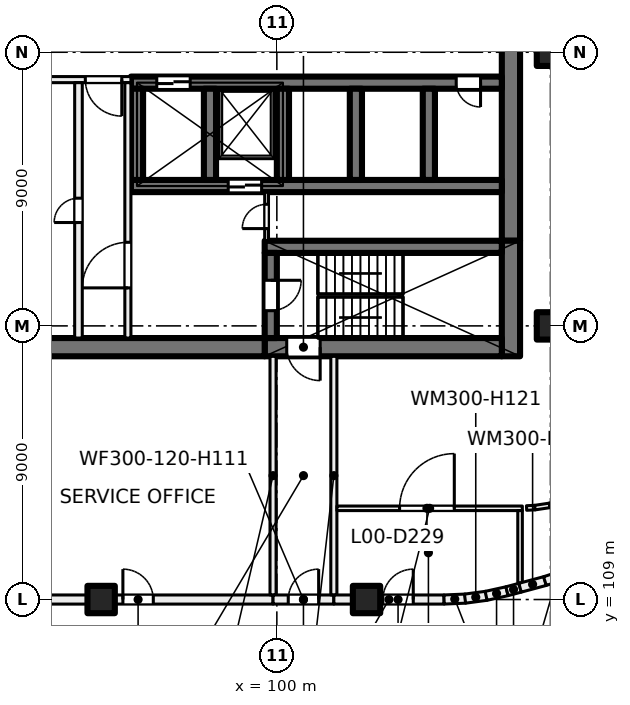
"""IFC4 building model, lengths in metres.
Left out: names, types, materials, properties, quantities, classifications, styles, units other than length and angle.
Written with IfcOpenShell. Run it as: python <this file> out.ifc"""

import sys

from ifc_helpers import new_model, si_unit, direction, frame, frame_2d, origin, origin_2d, place, context, subcontext, project, spatial, rectangle, extrude, element, fill, save


model = new_model("IFC4")
c1 = context("Model", 3, precision=1e-05, world=origin(), true_north=direction((0.0, 1.0)))
c2 = subcontext(c1, "Body", "Model", "MODEL_VIEW")
j1 = project(units=[si_unit("LENGTHUNIT", "METRE"), si_unit("PLANEANGLEUNIT", "RADIAN")], contexts=[c1])
p1 = place(None, origin())
s1 = spatial("IfcSite", under=j1, at=p1, CompositionType="ELEMENT")
p2 = place(p1, origin())
s2 = spatial("IfcBuilding", under=s1, at=p2, CompositionType="ELEMENT")
p3 = place(p2, origin())
s3 = spatial("IfcBuildingStorey", under=s2, at=p3, CompositionType="ELEMENT", Elevation=0.0)
for number, where, z_axis, x_axis in (
    (1, (109.0, 118.0, 0.0), (0.0, 0.0, 1.0), (1.0, 0.0, 0.0)),
    (2, (109.0, 127.0, 0.0), (0.0, 0.0, 1.0), (1.0, 0.0, 0.0)),
    (3, (94.221, 109.0, 0.0), (0.0, 0.0, 1.0), (1.0, 0.0, 0.0)),
    (4, (102.95, 109.0, 0.0), (0.0, 0.0, 1.0), (1.0, 0.0, 0.0)),
):
    element("IfcColumn", number, at=place(p3, frame(where, z_axis=z_axis, x_axis=x_axis)), inside=s3, PredefinedType="COLUMN", context=c2, shape_type="SweptSolid", body=[
        extrude(rectangle(XDim=0.9, YDim=0.9, at=origin_2d()), origin(), (0.0, 0.0, 1.0), 7.5),
    ])
p4 = place(p3, frame((107.7, 135.2, 0.0), z_axis=(0.0, 0.0, 1.0), x_axis=(0.0, -1.0, 0.0)))
e5 = element("IfcWall", 5, at=p4, inside=s3, PredefinedType="SHEAR", context=c2, shape_type="SweptSolid", body=[
    extrude(rectangle(XDim=14.4, YDim=0.6, at=frame_2d((7.2, 0.0))), origin(), (0.0, 0.0, 1.0), 7.5),
])
p5 = place(p3, frame((107.7, 120.8, 0.0), z_axis=(0.0, 0.0, 1.0), x_axis=(0.0, -1.0, 0.0)))
e6 = element("IfcWall", 6, at=p5, inside=s3, PredefinedType="SHEAR", context=c2, shape_type="SweptSolid", body=[
    extrude(rectangle(XDim=3.8, YDim=0.6, at=frame_2d((1.9, 0.0))), origin(), (0.0, 0.0, 1.0), 7.5),
])
p6 = place(p3, frame((107.4, 117.3, 0.0), z_axis=(0.0, 0.0, 1.0), x_axis=(-1.0, 0.0, 0.0)))
e7 = element("IfcWall", 7, at=p6, inside=s3, PredefinedType="SHEAR", context=c2, shape_type="SweptSolid", body=[
    extrude(rectangle(XDim=7.8, YDim=0.6, at=frame_2d((3.9, 0.0))), origin(), (0.0, 0.0, 1.0), 7.5),
])
p7 = place(p6, frame((5.975, 0.0, 0.0)))
e8 = element("IfcOpeningElement", 8, at=p7, cuts=e7, PredefinedType="OPENING", context=c2, shape_type="SweptSolid", body=[
    extrude(rectangle(XDim=1.1, YDim=2.1, at=frame_2d((0.55, 1.05))), frame((0.0, 0.31, 0.0), z_axis=(0.0, -1.0, 0.0), x_axis=(1.0, 0.0, 0.0)), (0.0, 0.0, 1.0), 0.62),
])
p8 = place(p3, frame((99.6, 117.3, 0.0), z_axis=(0.0, 0.0, 1.0), x_axis=(-1.0, 0.0, 0.0)))
e9 = element("IfcWall", 9, at=p8, inside=s3, PredefinedType="SHEAR", context=c2, shape_type="SweptSolid", body=[
    extrude(rectangle(XDim=8.9, YDim=0.6, at=frame_2d((4.45, 0.0))), origin(), (0.0, 0.0, 1.0), 7.5),
])
p9 = place(p3, frame((107.4, 120.6, 0.0), z_axis=(0.0, 0.0, 1.0), x_axis=(-1.0, 0.0, 0.0)))
e10 = element("IfcWall", 10, at=p9, inside=s3, PredefinedType="SHEAR", context=c2, shape_type="SweptSolid", body=[
    extrude(rectangle(XDim=7.8, YDim=0.4, at=frame_2d((3.9, 0.0))), origin(), (0.0, 0.0, 1.0), 7.5),
])
p10 = place(p3, frame((99.8, 120.4, 0.0), z_axis=(0.0, 0.0, 1.0), x_axis=(0.0, -1.0, 0.0)))
e11 = element("IfcWall", 11, at=p10, inside=s3, PredefinedType="SHEAR", context=c2, shape_type="SweptSolid", body=[
    extrude(rectangle(XDim=2.8, YDim=0.4, at=frame_2d((1.4, 0.0))), origin(), (0.0, 0.0, 1.0), 7.5),
])
p11 = place(p10, frame((0.9, 0.0, 0.0)))
e12 = element("IfcOpeningElement", 12, at=p11, cuts=e11, PredefinedType="OPENING", context=c2, shape_type="SweptSolid", body=[
    extrude(rectangle(XDim=1.0, YDim=2.1, at=frame_2d((0.5, 1.05))), frame((0.0, 0.21, 0.0), z_axis=(0.0, -1.0, 0.0), x_axis=(1.0, 0.0, 0.0)), (0.0, 0.0, 1.0), 0.42),
])
p12 = place(p3, frame((107.4, 126.0, 0.0), z_axis=(0.0, 0.0, 1.0), x_axis=(-1.0, 0.0, 0.0)))
e13 = element("IfcWall", 13, at=p12, inside=s3, PredefinedType="SHEAR", context=c2, shape_type="SweptSolid", body=[
    extrude(rectangle(XDim=12.2, YDim=0.4, at=frame_2d((6.1, 0.0))), origin(), (0.0, 0.0, 1.0), 7.5),
])
p13 = place(p12, frame((10.25, 0.0, 0.0)))
e14 = element("IfcOpeningElement", 14, at=p13, cuts=e13, PredefinedType="OPENING", context=c2, shape_type="SweptSolid", body=[
    extrude(rectangle(XDim=1.1, YDim=2.1, at=frame_2d((0.55, 1.05))), frame((0.0, 0.21, 0.0), z_axis=(0.0, -1.0, 0.0), x_axis=(1.0, 0.0, 0.0)), (0.0, 0.0, 1.0), 0.42),
])
p14 = place(p12, frame((0.7, 0.0, 0.0)))
e15 = element("IfcOpeningElement", 15, at=p14, cuts=e13, PredefinedType="OPENING", context=c2, shape_type="SweptSolid", body=[
    extrude(rectangle(XDim=0.8, YDim=2.1, at=frame_2d((0.4, 1.05))), frame((0.0, 0.21, 0.0), z_axis=(0.0, -1.0, 0.0), x_axis=(1.0, 0.0, 0.0)), (0.0, 0.0, 1.0), 0.42),
])
p15 = place(p3, frame((107.4, 122.6, 0.0), z_axis=(0.0, 0.0, 1.0), x_axis=(-1.0, 0.0, 0.0)))
e16 = element("IfcWall", 16, at=p15, inside=s3, PredefinedType="SHEAR", context=c2, shape_type="SweptSolid", body=[
    extrude(rectangle(XDim=12.2, YDim=0.4, at=frame_2d((6.1, 0.0))), origin(), (0.0, 0.0, 1.0), 7.5),
])
p16 = place(p15, frame((7.9, 0.0, 0.0)))
e17 = element("IfcOpeningElement", 17, at=p16, cuts=e16, PredefinedType="OPENING", context=c2, shape_type="SweptSolid", body=[
    extrude(rectangle(XDim=1.1, YDim=2.1, at=frame_2d((0.55, 1.05))), frame((0.0, 0.21, 0.0), z_axis=(0.0, -1.0, 0.0), x_axis=(1.0, 0.0, 0.0)), (0.0, 0.0, 1.0), 0.42),
])
for number, where, z_axis, x_axis in (
    (18, (105.0, 125.8, 0.0), (0.0, 0.0, 1.0), (0.0, -1.0, 0.0)),
    (19, (102.6, 125.8, 0.0), (0.0, 0.0, 1.0), (0.0, -1.0, 0.0)),
    (20, (100.2, 125.8, 0.0), (0.0, 0.0, 1.0), (0.0, -1.0, 0.0)),
    (21, (97.8, 125.8, 0.0), (0.0, 0.0, 1.0), (0.0, -1.0, 0.0)),
    (22, (95.4, 125.8, 0.0), (0.0, 0.0, 1.0), (0.0, -1.0, 0.0)),
):
    element("IfcWall", number, at=place(p3, frame(where, z_axis=z_axis, x_axis=x_axis)), inside=s3, PredefinedType="SHEAR", context=c2, shape_type="SweptSolid", body=[
        extrude(rectangle(XDim=3.0, YDim=0.4, at=frame_2d((1.5, 0.0))), origin(), (0.0, 0.0, 1.0), 7.5),
    ])
p17 = place(p3, frame((95.2, 126.1, 0.0), z_axis=(0.0, 0.0, 1.0), x_axis=(-1.0, 0.0, 0.0)))
e23 = element("IfcWall", 23, at=p17, inside=s3, PredefinedType="PARTITIONING", context=c2, shape_type="SweptSolid", body=[
    extrude(rectangle(XDim=3.8, YDim=0.2, at=frame_2d((1.9, 0.0))), origin(), (0.0, 0.0, 1.0), 7.1),
])
p18 = place(p17, frame((0.3, 0.0, 0.0)))
e24 = element("IfcOpeningElement", 24, at=p18, cuts=e23, PredefinedType="OPENING", context=c2, shape_type="SweptSolid", body=[
    extrude(rectangle(XDim=1.2, YDim=2.1, at=frame_2d((0.6, 1.05))), frame((0.0, 0.11, 0.0), z_axis=(0.0, -1.0, 0.0), x_axis=(1.0, 0.0, 0.0)), (0.0, 0.0, 1.0), 0.22),
])
p19 = place(p3, frame((95.1, 117.6, 0.0), z_axis=(0.0, 0.0, 1.0), x_axis=(0.0, 1.0, 0.0)))
e25 = element("IfcWall", 25, at=p19, inside=s3, PredefinedType="PARTITIONING", context=c2, shape_type="SweptSolid", body=[
    extrude(rectangle(XDim=8.4, YDim=0.2, at=frame_2d((4.2, 0.0))), origin(), (0.0, 0.0, 1.0), 7.1),
])
p20 = place(p19, frame((1.65, 0.0, 0.0)))
e26 = element("IfcOpeningElement", 26, at=p20, cuts=e25, PredefinedType="OPENING", context=c2, shape_type="SweptSolid", body=[
    extrude(rectangle(XDim=1.5, YDim=2.1, at=frame_2d((0.75, 1.05))), frame((0.0, 0.11, 0.0), z_axis=(0.0, -1.0, 0.0), x_axis=(1.0, 0.0, 0.0)), (0.0, 0.0, 1.0), 0.22),
])
p21 = place(p3, frame((93.475, 117.6, 0.0), z_axis=(0.0, 0.0, 1.0), x_axis=(0.0, 1.0, 0.0)))
e27 = element("IfcWall", 27, at=p21, inside=s3, PredefinedType="PARTITIONING", context=c2, shape_type="SweptSolid", body=[
    extrude(rectangle(XDim=8.4, YDim=0.25, at=frame_2d((4.2, 0.0))), origin(), (0.0, 0.0, 1.0), 7.1),
])
p22 = place(p21, frame((3.8, 0.0, 0.0)))
e28 = element("IfcOpeningElement", 28, at=p22, cuts=e27, PredefinedType="OPENING", context=c2, shape_type="SweptSolid", body=[
    extrude(rectangle(XDim=0.8, YDim=2.1, at=frame_2d((0.4, 1.05))), frame((0.0, 0.135, 0.0), z_axis=(0.0, -1.0, 0.0), x_axis=(1.0, 0.0, 0.0)), (0.0, 0.0, 1.0), 0.27),
])
p23 = place(p3, frame((99.663, 120.8, 0.0), z_axis=(0.0, 0.0, 1.0), x_axis=(0.0, 1.0, 0.0)))
e29 = element("IfcWall", 29, at=p23, inside=s3, PredefinedType="PARTITIONING", context=c2, shape_type="SweptSolid", body=[
    extrude(rectangle(XDim=1.6, YDim=0.125, at=frame_2d((0.8, 0.0))), origin(), (0.0, 0.0, 1.0), 7.1),
])
p24 = place(p23, frame((0.4, 0.0, 0.0)))
e30 = element("IfcOpeningElement", 30, at=p24, cuts=e29, PredefinedType="OPENING", context=c2, shape_type="SweptSolid", body=[
    extrude(rectangle(XDim=0.8, YDim=2.1, at=frame_2d((0.4, 1.05))), frame((0.0, 0.073, 0.0), z_axis=(0.0, -1.0, 0.0), x_axis=(1.0, 0.0, 0.0)), (0.0, 0.0, 1.0), 0.145),
])
p25 = place(p3, frame((76.75, 109.0, 0.0), z_axis=(0.0, 0.0, 1.0), x_axis=(1.0, 0.0, 0.0)))
e31 = element("IfcWall", 31, at=p25, inside=s3, PredefinedType="PARTITIONING", context=c2, shape_type="SweptSolid", body=[
    extrude(rectangle(XDim=23.125, YDim=0.3, at=frame_2d((11.562, 0.0))), origin(), (0.0, 0.0, 1.0), 11.1),
])
p26 = place(p25, frame((1.425, 0.0, 0.0)))
e32 = element("IfcOpeningElement", 32, at=p26, cuts=e31, PredefinedType="OPENING", context=c2, shape_type="SweptSolid", body=[
    extrude(rectangle(XDim=2.4, YDim=2.4, at=frame_2d((1.2, 1.2))), frame((0.0, 0.16, 0.0), z_axis=(0.0, -1.0, 0.0), x_axis=(1.0, 0.0, 0.0)), (0.0, 0.0, 1.0), 0.32),
])
p27 = place(p25, frame((18.186, 0.0, 0.0)))
e33 = element("IfcOpeningElement", 33, at=p27, cuts=e31, PredefinedType="OPENING", context=c2, shape_type="SweptSolid", body=[
    extrude(rectangle(XDim=1.0, YDim=2.1, at=frame_2d((0.5, 1.05))), frame((0.0, 0.16, 0.0), z_axis=(0.0, -1.0, 0.0), x_axis=(1.0, 0.0, 0.0)), (0.0, 0.0, 1.0), 0.32),
])
p28 = place(p3, frame((99.875, 109.15, 0.0), z_axis=(0.0, 0.0, 1.0), x_axis=(0.0, 1.0, 0.0)))
e34 = element("IfcWall", 34, at=p28, inside=s3, PredefinedType="PARTITIONING", context=c2, shape_type="SweptSolid", body=[
    extrude(rectangle(XDim=7.85, YDim=0.2, at=frame_2d((3.925, 0.0))), origin(), (0.0, 0.0, 1.0), 7.1),
])
p29 = place(p3, frame((101.875, 109.0, 0.0), z_axis=(0.0, 0.0, 1.0), x_axis=(-1.0, 0.0, 0.0)))
e35 = element("IfcWall", 35, at=p29, inside=s3, PredefinedType="PARTITIONING", context=c2, shape_type="SweptSolid", body=[
    extrude(rectangle(XDim=2.0, YDim=0.3, at=frame_2d((1.0, 0.0))), origin(), (0.0, 0.0, 1.0), 11.1),
])
p30 = place(p29, frame((0.5, 0.0, 0.0)))
e36 = element("IfcOpeningElement", 36, at=p30, cuts=e35, PredefinedType="OPENING", context=c2, shape_type="SweptSolid", body=[
    extrude(rectangle(XDim=1.0, YDim=2.1, at=frame_2d((0.5, 1.05))), frame((0.0, 0.16, 0.0), z_axis=(0.0, -1.0, 0.0), x_axis=(1.0, 0.0, 0.0)), (0.0, 0.0, 1.0), 0.32),
])
p31 = place(p3, frame((101.875, 109.15, 0.0), z_axis=(0.0, 0.0, 1.0), x_axis=(0.0, 1.0, 0.0)))
e37 = element("IfcWall", 37, at=p31, inside=s3, PredefinedType="PARTITIONING", context=c2, shape_type="SweptSolid", body=[
    extrude(rectangle(XDim=7.85, YDim=0.2, at=frame_2d((3.925, 0.0))), origin(), (0.0, 0.0, 1.0), 7.1),
])
p32 = place(p3, frame((105.5, 109.0, 0.0), z_axis=(0.0, 0.0, 1.0), x_axis=(-1.0, 0.0, 0.0)))
e38 = element("IfcWall", 38, at=p32, inside=s3, PredefinedType="PARTITIONING", context=c2, shape_type="SweptSolid", body=[
    extrude(rectangle(XDim=3.625, YDim=0.3, at=frame_2d((1.812, 0.0))), origin(), (0.0, 0.0, 1.0), 11.1),
])
p33 = place(p32, frame((1.013, 0.0, 0.0)))
e39 = element("IfcOpeningElement", 39, at=p33, cuts=e38, PredefinedType="OPENING", context=c2, shape_type="SweptSolid", body=[
    extrude(rectangle(XDim=1.0, YDim=2.1, at=frame_2d((0.5, 1.05))), frame((0.0, 0.16, 0.0), z_axis=(0.0, -1.0, 0.0), x_axis=(1.0, 0.0, 0.0)), (0.0, 0.0, 1.0), 0.32),
])
p34 = place(p3, frame((108.075, 112.0, 0.0), z_axis=(0.0, 0.0, 1.0), x_axis=(-1.0, 0.0, 0.0)))
e40 = element("IfcWall", 40, at=p34, inside=s3, PredefinedType="PARTITIONING", context=c2, shape_type="SweptSolid", body=[
    extrude(rectangle(XDim=6.1, YDim=0.15, at=frame_2d((3.05, 0.0))), origin(), (0.0, 0.0, 1.0), 7.1),
])
p35 = place(p34, frame((2.238, 0.0, 0.0)))
e41 = element("IfcOpeningElement", 41, at=p35, cuts=e40, PredefinedType="OPENING", context=c2, shape_type="SweptSolid", body=[
    extrude(rectangle(XDim=1.8, YDim=2.1, at=frame_2d((0.9, 1.05))), frame((0.0, 0.085, 0.0), z_axis=(0.0, -1.0, 0.0), x_axis=(1.0, 0.0, 0.0)), (0.0, 0.0, 1.0), 0.17),
])
p36 = place(p3, frame((105.5, 109.0, 0.0), z_axis=(0.0, 0.0, 1.0), x_axis=(0.999091766033, 0.042610363114, 0.0)))
e42 = element("IfcWall", 42, at=p36, inside=s3, PredefinedType="PARTITIONING", context=c2, shape_type="SweptSolid", body=[
    extrude(rectangle(XDim=0.705, YDim=0.3, at=frame_2d((0.353, 0.0))), origin(), (0.0, 0.0, 1.0), 12.1),
])
p37 = place(p3, frame((106.19, 109.029, 0.0), z_axis=(0.0, 0.0, 1.0), x_axis=(0.991230898017, 0.132141238136, 0.0)))
e43 = element("IfcWall", 43, at=p37, inside=s3, PredefinedType="PARTITIONING", context=c2, shape_type="SweptSolid", body=[
    extrude(rectangle(XDim=0.711, YDim=0.3, at=frame_2d((0.356, 0.0))), origin(), (0.0, 0.0, 1.0), 12.1),
])
p38 = place(p3, frame((106.883, 109.121, 0.0), z_axis=(0.0, 0.0, 1.0), x_axis=(0.976495894977, 0.21553599953, 0.0)))
e44 = element("IfcWall", 44, at=p38, inside=s3, PredefinedType="PARTITIONING", context=c2, shape_type="SweptSolid", body=[
    extrude(rectangle(XDim=0.705, YDim=0.3, at=frame_2d((0.352, 0.0))), origin(), (0.0, 0.0, 1.0), 12.1),
])
p39 = place(p3, frame((107.571, 109.273, 0.0), z_axis=(0.0, 0.0, 1.0), x_axis=(0.965896509383, 0.25892843251, 0.0)))
e45 = element("IfcWall", 45, at=p39, inside=s3, PredefinedType="PARTITIONING", context=c2, shape_type="SweptSolid", body=[
    extrude(rectangle(XDim=0.444, YDim=0.3, at=frame_2d((0.222, 0.0))), origin(), (0.0, 0.0, 1.0), 12.1),
])
p40 = place(p3, frame((108.0, 109.543, 0.0), z_axis=(0.0, 0.0, 1.0), x_axis=(0.0, 1.0, 0.0)))
e46 = element("IfcWall", 46, at=p40, inside=s3, PredefinedType="PARTITIONING", context=c2, shape_type="SweptSolid", body=[
    extrude(rectangle(XDim=2.382, YDim=0.15, at=frame_2d((1.191, 0.0))), origin(), (0.0, 0.0, 1.0), 7.1),
])
p41 = place(p3, frame((108.0, 109.388, 0.0), z_axis=(0.0, 0.0, 1.0), x_axis=(0.965954430336, 0.258712269741, 0.0)))
e47 = element("IfcWall", 47, at=p41, inside=s3, PredefinedType="PARTITIONING", context=c2, shape_type="SweptSolid", body=[
    extrude(rectangle(XDim=0.854, YDim=0.3, at=frame_2d((0.427, 0.0))), origin(), (0.0, 0.0, 1.0), 12.1),
])
p42 = place(p3, frame((108.214, 112.01, 0.0), z_axis=(0.0, 0.0, 1.0), x_axis=(0.99876534507, 0.049676810357, 0.0)))
e48 = element("IfcWall", 48, at=p42, inside=s3, PredefinedType="PARTITIONING", context=c2, shape_type="SweptSolid", body=[
    extrude(rectangle(XDim=0.28, YDim=0.15, at=frame_2d((0.14, 0.0))), origin(), (0.0, 0.0, 1.0), 7.1),
])
p43 = place(p3, frame((108.486, 112.023, 0.0), z_axis=(0.0, 0.0, 1.0), x_axis=(0.988925572052, 0.148412307247, 0.0)))
e49 = element("IfcWall", 49, at=p43, inside=s3, PredefinedType="PARTITIONING", context=c2, shape_type="SweptSolid", body=[
    extrude(rectangle(XDim=0.499, YDim=0.15, at=frame_2d((0.249, 0.0))), origin(), (0.0, 0.0, 1.0), 7.1),
])
p44 = place(p3, frame((108.817, 109.607, 0.0), z_axis=(0.0, 0.0, 1.0), x_axis=(0.951602885229, 0.307330357798, 0.0)))
e50 = element("IfcWall", 50, at=p44, inside=s3, PredefinedType="PARTITIONING", context=c2, shape_type="SweptSolid", body=[
    extrude(rectangle(XDim=0.849, YDim=0.3, at=frame_2d((0.425, 0.0))), origin(), (0.0, 0.0, 1.0), 12.1),
])
p45 = place(p3, frame((108.971, 112.095, 0.0), z_axis=(0.0, 0.0, 1.0), x_axis=(0.970113715952, 0.242650732785, 0.0)))
e51 = element("IfcWall", 51, at=p45, inside=s3, PredefinedType="PARTITIONING", context=c2, shape_type="SweptSolid", body=[
    extrude(rectangle(XDim=0.499, YDim=0.15, at=frame_2d((0.25, 0.0))), origin(), (0.0, 0.0, 1.0), 7.1),
])
p46 = place(p13, origin())
e52 = element("IfcDoor", 52, at=p46, inside=s3, OperationType="DOUBLE_DOOR_SLIDING", PredefinedType="DOOR", context=c2, shape_type="SweptSolid", body=[
    extrude(rectangle(XDim=1.1, YDim=2.1, at=frame_2d((0.55, 1.05))), frame((0.0, 0.025, 0.0), z_axis=(0.0, -1.0, 0.0), x_axis=(1.0, 0.0, 0.0)), (0.0, 0.0, 1.0), 0.05),
])
fill(e14, e52)
p47 = place(p14, origin())
e53 = element("IfcDoor", 53, at=p47, inside=s3, OperationType="SINGLE_SWING_LEFT", PredefinedType="DOOR", context=c2, shape_type="SweptSolid", body=[
    extrude(rectangle(XDim=0.8, YDim=2.1, at=frame_2d((0.4, 1.05))), frame((0.0, 0.025, 0.0), z_axis=(0.0, -1.0, 0.0), x_axis=(1.0, 0.0, 0.0)), (0.0, 0.0, 1.0), 0.05),
])
fill(e15, e53)
p48 = place(p18, origin())
e54 = element("IfcDoor", 54, at=p48, inside=s3, OperationType="DOUBLE_DOOR_SINGLE_SWING", PredefinedType="DOOR", context=c2, shape_type="SweptSolid", body=[
    extrude(rectangle(XDim=1.2, YDim=2.1, at=frame_2d((0.6, 1.05))), frame((0.0, 0.025, 0.0), z_axis=(0.0, -1.0, 0.0), x_axis=(1.0, 0.0, 0.0)), (0.0, 0.0, 1.0), 0.05),
])
fill(e24, e54)
p49 = place(p20, origin())
e55 = element("IfcDoor", 55, at=p49, inside=s3, OperationType="DOUBLE_DOOR_SINGLE_SWING", PredefinedType="DOOR", context=c2, shape_type="SweptSolid", body=[
    extrude(rectangle(XDim=1.5, YDim=2.1, at=frame_2d((0.75, 1.05))), frame((0.0, 0.025, 0.0), z_axis=(0.0, -1.0, 0.0), x_axis=(1.0, 0.0, 0.0)), (0.0, 0.0, 1.0), 0.05),
])
fill(e26, e55)
p50 = place(p11, origin())
e56 = element("IfcDoor", 56, at=p50, inside=s3, OperationType="SINGLE_SWING_LEFT", PredefinedType="DOOR", context=c2, shape_type="SweptSolid", body=[
    extrude(rectangle(XDim=1.0, YDim=2.1, at=frame_2d((0.5, 1.05))), frame((0.0, 0.025, 0.0), z_axis=(0.0, -1.0, 0.0), x_axis=(1.0, 0.0, 0.0)), (0.0, 0.0, 1.0), 0.05),
])
fill(e12, e56)
p51 = place(p24, origin())
e57 = element("IfcDoor", 57, at=p51, inside=s3, OperationType="SINGLE_SWING_RIGHT", PredefinedType="DOOR", context=c2, shape_type="SweptSolid", body=[
    extrude(rectangle(XDim=0.8, YDim=2.1, at=frame_2d((0.4, 1.05))), frame((0.0, 0.025, 0.0), z_axis=(0.0, -1.0, 0.0), x_axis=(1.0, 0.0, 0.0)), (0.0, 0.0, 1.0), 0.05),
])
fill(e30, e57)
p52 = place(p22, origin())
e58 = element("IfcDoor", 58, at=p52, inside=s3, OperationType="SINGLE_SWING_LEFT", PredefinedType="DOOR", context=c2, shape_type="SweptSolid", body=[
    extrude(rectangle(XDim=0.8, YDim=2.1, at=frame_2d((0.4, 1.05))), frame((0.0, 0.025, 0.0), z_axis=(0.0, -1.0, 0.0), x_axis=(1.0, 0.0, 0.0)), (0.0, 0.0, 1.0), 0.05),
])
fill(e28, e58)
p53 = place(p16, origin())
e59 = element("IfcDoor", 59, at=p53, inside=s3, OperationType="DOUBLE_DOOR_SLIDING", PredefinedType="DOOR", context=c2, shape_type="SweptSolid", body=[
    extrude(rectangle(XDim=1.1, YDim=2.1, at=frame_2d((0.55, 1.05))), frame((0.0, 0.025, 0.0), z_axis=(0.0, -1.0, 0.0), x_axis=(1.0, 0.0, 0.0)), (0.0, 0.0, 1.0), 0.05),
])
fill(e17, e59)
p54 = place(p7, origin())
e60 = element("IfcDoor", 60, at=p54, inside=s3, OperationType="SINGLE_SWING_LEFT", PredefinedType="DOOR", context=c2, shape_type="SweptSolid", body=[
    extrude(rectangle(XDim=1.1, YDim=2.1, at=frame_2d((0.55, 1.05))), frame((0.0, 0.025, 0.0), z_axis=(0.0, -1.0, 0.0), x_axis=(1.0, 0.0, 0.0)), (0.0, 0.0, 1.0), 0.05),
])
fill(e8, e60)
p55 = place(p27, origin())
e61 = element("IfcDoor", 61, at=p55, inside=s3, OperationType="SINGLE_SWING_LEFT", PredefinedType="DOOR", context=c2, shape_type="SweptSolid", body=[
    extrude(rectangle(XDim=1.0, YDim=2.1, at=frame_2d((0.5, 1.05))), frame((0.0, 0.025, 0.0), z_axis=(0.0, -1.0, 0.0), x_axis=(1.0, 0.0, 0.0)), (0.0, 0.0, 1.0), 0.05),
])
fill(e33, e61)
p56 = place(p30, origin())
e62 = element("IfcDoor", 62, at=p56, inside=s3, OperationType="SINGLE_SWING_LEFT", PredefinedType="DOOR", context=c2, shape_type="SweptSolid", body=[
    extrude(rectangle(XDim=1.0, YDim=2.1, at=frame_2d((0.5, 1.05))), frame((0.0, 0.025, 0.0), z_axis=(0.0, -1.0, 0.0), x_axis=(1.0, 0.0, 0.0)), (0.0, 0.0, 1.0), 0.05),
])
fill(e36, e62)
p57 = place(p33, origin())
e63 = element("IfcDoor", 63, at=p57, inside=s3, OperationType="SINGLE_SWING_LEFT", PredefinedType="DOOR", context=c2, shape_type="SweptSolid", body=[
    extrude(rectangle(XDim=1.0, YDim=2.1, at=frame_2d((0.5, 1.05))), frame((0.0, 0.025, 0.0), z_axis=(0.0, -1.0, 0.0), x_axis=(1.0, 0.0, 0.0)), (0.0, 0.0, 1.0), 0.05),
])
fill(e39, e63)
p58 = place(p35, origin())
e64 = element("IfcDoor", 64, at=p58, inside=s3, OperationType="DOUBLE_DOOR_SINGLE_SWING", PredefinedType="DOOR", context=c2, shape_type="SweptSolid", body=[
    extrude(rectangle(XDim=1.8, YDim=2.1, at=frame_2d((0.9, 1.05))), frame((0.0, 0.025, 0.0), z_axis=(0.0, -1.0, 0.0), x_axis=(1.0, 0.0, 0.0)), (0.0, 0.0, 1.0), 0.05),
])
fill(e41, e64)
save(model, sys.argv[1])
